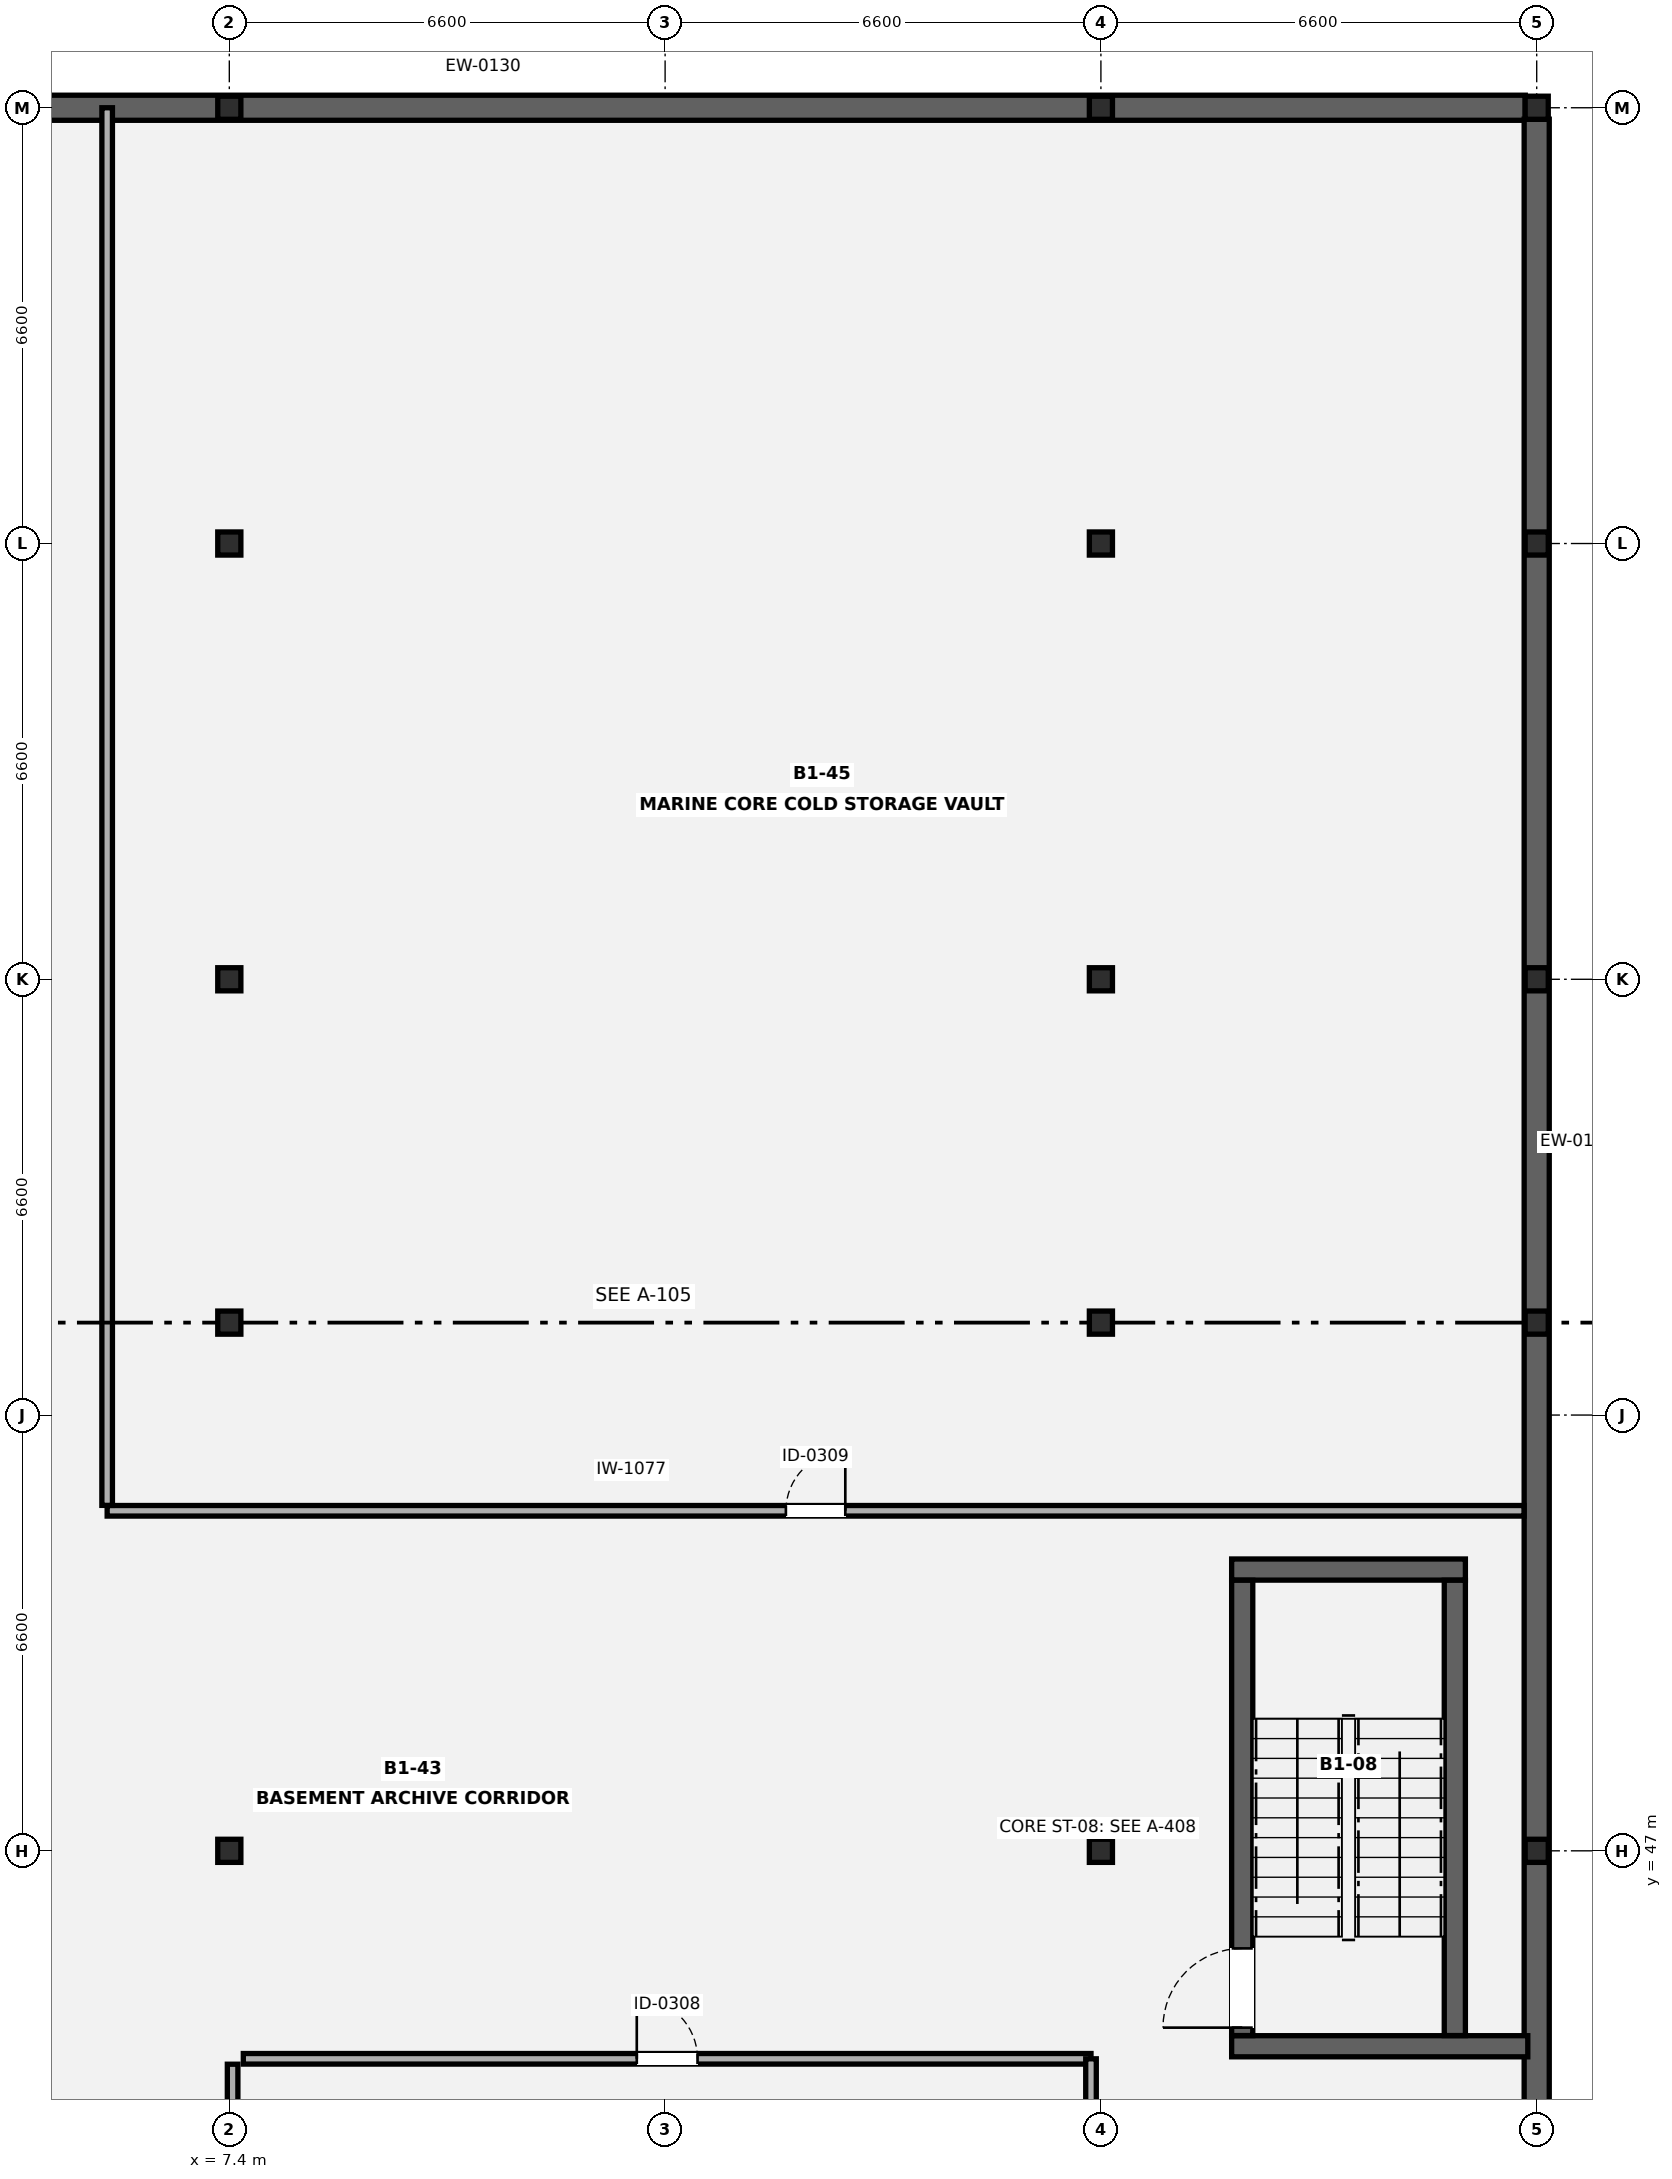
"""IFC4 building model, lengths in metres.
Left out: names, types, materials, properties, quantities, classifications, styles, units other than length and angle.
Written with IfcOpenShell. Run it as: python <this file> out.ifc"""

import sys

from ifc_helpers import new_model, si_unit, direction, frame, frame_2d, origin, origin_2d, place, context, subcontext, project, spatial, rectangle, i_section, extrude, element, fill, save


model = new_model("IFC4")
c1 = context("Model", 3, precision=1e-05, world=origin(), true_north=direction((0.0, 1.0)))
c2 = subcontext(c1, "Body", "Model", "MODEL_VIEW")
j1 = project(units=[si_unit("LENGTHUNIT", "METRE"), si_unit("PLANEANGLEUNIT", "RADIAN")], contexts=[c1])
p1 = place(None, origin())
s1 = spatial("IfcSite", under=j1, at=p1, CompositionType="ELEMENT")
p2 = place(p1, origin())
s2 = spatial("IfcBuilding", under=s1, at=p2, CompositionType="ELEMENT")
p3 = place(p2, frame((0.0, 0.0, -4.2)))
s3 = spatial("IfcBuildingStorey", under=s2, at=p3, CompositionType="ELEMENT", Elevation=-4.2)
for number, where, z_axis, x_axis in (
    (1, (7.4, 47.0, 0.0), (0.0, 0.0, 1.0), (1.0, 0.0, 0.0)),
    (2, (7.4, 55.0, 0.0), (0.0, 0.0, 1.0), (1.0, 0.0, 0.0)),
    (3, (7.4, 60.2, 0.0), (0.0, 0.0, 1.0), (1.0, 0.0, 0.0)),
    (4, (7.4, 66.8, 0.0), (0.0, 0.0, 1.0), (1.0, 0.0, 0.0)),
    (5, (7.4, 73.4, 0.0), (0.0, 0.0, 1.0), (1.0, 0.0, 0.0)),
    (6, (20.6, 47.0, 0.0), (0.0, 0.0, 1.0), (1.0, 0.0, 0.0)),
    (7, (20.6, 55.0, 0.0), (0.0, 0.0, 1.0), (1.0, 0.0, 0.0)),
    (8, (20.6, 60.2, 0.0), (0.0, 0.0, 1.0), (1.0, 0.0, 0.0)),
    (9, (20.6, 66.8, 0.0), (0.0, 0.0, 1.0), (1.0, 0.0, 0.0)),
    (10, (20.6, 73.4, 0.0), (0.0, 0.0, 1.0), (1.0, 0.0, 0.0)),
    (11, (27.2, 47.0, 0.0), (0.0, 0.0, 1.0), (1.0, 0.0, 0.0)),
    (12, (27.2, 55.0, 0.0), (0.0, 0.0, 1.0), (1.0, 0.0, 0.0)),
    (13, (27.2, 60.2, 0.0), (0.0, 0.0, 1.0), (1.0, 0.0, 0.0)),
    (14, (27.2, 66.8, 0.0), (0.0, 0.0, 1.0), (1.0, 0.0, 0.0)),
    (15, (27.2, 73.4, 0.0), (0.0, 0.0, 1.0), (1.0, 0.0, 0.0)),
):
    element("IfcColumn", number, at=place(p3, frame(where, z_axis=z_axis, x_axis=x_axis)), inside=s3, PredefinedType="COLUMN", context=c2, shape_type="SweptSolid", body=[
        extrude(i_section(OverallWidth=0.35, OverallDepth=0.35, WebThickness=0.02, FlangeThickness=0.032, FilletRadius=0.016, at=origin_2d()), origin(), (0.0, 0.0, 1.0), 4.2),
    ])
p4 = place(p3, frame((1.973, 73.4, 0.0), z_axis=(0.0, 0.0, 1.0), x_axis=(1.0, 0.0, 0.0)))
e16 = element("IfcWall", 16, at=p4, inside=s3, PredefinedType="USERDEFINED", context=c2, shape_type="SweptSolid", body=[
    extrude(rectangle(XDim=25.054, YDim=0.38, at=frame_2d((12.527, 0.0))), origin(), (0.0, 0.0, 1.0), 3.9),
])
p5 = place(p3, frame((27.2, 73.227, 0.0), z_axis=(0.0, 0.0, 1.0), x_axis=(0.0, -1.0, 0.0)))
e17 = element("IfcWall", 17, at=p5, inside=s3, PredefinedType="USERDEFINED", context=c2, shape_type="SweptSolid", body=[
    extrude(rectangle(XDim=41.854, YDim=0.38, at=frame_2d((20.927, 0.0))), origin(), (0.0, 0.0, 1.0), 3.9),
])
p6 = place(p3, frame((22.58, 44.04, 0.0), z_axis=(0.0, 0.0, 1.0), x_axis=(1.0, 0.0, 0.0)))
e18 = element("IfcWall", 18, at=p6, inside=s3, PredefinedType="SHEAR", context=c2, shape_type="SweptSolid", body=[
    extrude(rectangle(XDim=4.485, YDim=0.32, at=frame_2d((2.242, 0.0))), origin(), (0.0, 0.0, 1.0), 3.94),
])
p7 = place(p3, frame((22.58, 51.26, 0.0), z_axis=(0.0, 0.0, 1.0), x_axis=(1.0, 0.0, 0.0)))
e19 = element("IfcWall", 19, at=p7, inside=s3, PredefinedType="SHEAR", context=c2, shape_type="SweptSolid", body=[
    extrude(rectangle(XDim=3.54, YDim=0.32, at=frame_2d((1.77, 0.0))), origin(), (0.0, 0.0, 1.0), 3.94),
])
p8 = place(p3, frame((22.74, 44.202, 0.0), z_axis=(0.0, 0.0, 1.0), x_axis=(0.0, 1.0, 0.0)))
e20 = element("IfcWall", 20, at=p8, inside=s3, PredefinedType="SHEAR", context=c2, shape_type="SweptSolid", body=[
    extrude(rectangle(XDim=6.896, YDim=0.32, at=frame_2d((3.448, 0.0))), origin(), (0.0, 0.0, 1.0), 3.94),
])
p9 = place(p8, frame((0.12, 0.0, 0.0)))
e21 = element("IfcOpeningElement", 21, at=p9, cuts=e20, PredefinedType="OPENING", context=c2, shape_type="SweptSolid", body=[
    extrude(rectangle(XDim=1.2, YDim=2.15, at=frame_2d((0.6, 1.075))), frame((0.0, 0.17, 0.0), z_axis=(0.0, -1.0, 0.0), x_axis=(1.0, 0.0, 0.0)), (0.0, 0.0, 1.0), 0.34),
])
p10 = place(p3, frame((25.96, 44.202, 0.0), z_axis=(0.0, 0.0, 1.0), x_axis=(0.0, 1.0, 0.0)))
e22 = element("IfcWall", 22, at=p10, inside=s3, PredefinedType="SHEAR", context=c2, shape_type="SweptSolid", body=[
    extrude(rectangle(XDim=6.896, YDim=0.32, at=frame_2d((3.448, 0.0))), origin(), (0.0, 0.0, 1.0), 3.94),
])
p11 = place(p3, frame((7.612, 43.85, 0.0), z_axis=(0.0, 0.0, 1.0), x_axis=(1.0, 0.0, 0.0)))
e23 = element("IfcWall", 23, at=p11, inside=s3, PredefinedType="PARTITIONING", context=c2, shape_type="SweptSolid", body=[
    extrude(rectangle(XDim=12.838, YDim=0.16, at=frame_2d((6.419, 0.0))), origin(), (0.0, 0.0, 1.0), 3.605),
])
p12 = place(p11, frame((5.959, 0.0, 0.0)))
e24 = element("IfcOpeningElement", 24, at=p12, cuts=e23, PredefinedType="OPENING", context=c2, shape_type="SweptSolid", body=[
    extrude(rectangle(XDim=0.92, YDim=2.12, at=frame_2d((0.46, 1.06))), frame((0.0, 0.09, 0.0), z_axis=(0.0, -1.0, 0.0), x_axis=(1.0, 0.0, 0.0)), (0.0, 0.0, 1.0), 0.18),
])
p13 = place(p3, frame((7.45, 31.2, 0.0), z_axis=(0.0, 0.0, 1.0), x_axis=(0.0, 1.0, 0.0)))
e25 = element("IfcWall", 25, at=p13, inside=s3, PredefinedType="PARTITIONING", context=c2, shape_type="SweptSolid", body=[
    extrude(rectangle(XDim=12.568, YDim=0.16, at=frame_2d((6.284, 0.0))), origin(), (0.0, 0.0, 1.0), 3.445),
])
p14 = place(p3, frame((20.45, 31.2, 0.0), z_axis=(0.0, 0.0, 1.0), x_axis=(0.0, 1.0, 0.0)))
e26 = element("IfcWall", 26, at=p14, inside=s3, PredefinedType="PARTITIONING", context=c2, shape_type="SweptSolid", body=[
    extrude(rectangle(XDim=12.65, YDim=0.16, at=frame_2d((6.325, 0.0))), origin(), (0.0, 0.0, 1.0), 3.445),
])
p15 = place(p3, frame((5.55, 52.15, 0.0), z_axis=(0.0, 0.0, 1.0), x_axis=(1.0, 0.0, 0.0)))
e27 = element("IfcWall", 27, at=p15, inside=s3, PredefinedType="PARTITIONING", context=c2, shape_type="SweptSolid", body=[
    extrude(rectangle(XDim=21.458, YDim=0.16, at=frame_2d((10.729, 0.0))), origin(), (0.0, 0.0, 1.0), 3.94),
])
p16 = place(p15, frame((10.279, 0.0, 0.0)))
e28 = element("IfcOpeningElement", 28, at=p16, cuts=e27, PredefinedType="OPENING", context=c2, shape_type="SweptSolid", body=[
    extrude(rectangle(XDim=0.9, YDim=2.1, at=frame_2d((0.45, 1.05))), frame((0.0, 0.09, 0.0), z_axis=(0.0, -1.0, 0.0), x_axis=(1.0, 0.0, 0.0)), (0.0, 0.0, 1.0), 0.18),
])
p17 = place(p3, frame((5.55, 52.232, 0.0), z_axis=(0.0, 0.0, 1.0), x_axis=(0.0, 1.0, 0.0)))
e29 = element("IfcWall", 29, at=p17, inside=s3, PredefinedType="PARTITIONING", context=c2, shape_type="SweptSolid", body=[
    extrude(rectangle(XDim=21.168, YDim=0.16, at=frame_2d((10.584, 0.0))), origin(), (0.0, 0.0, 1.0), 3.94),
])
p18 = place(p9, origin())
e30 = element("IfcDoor", 30, at=p18, inside=s3, OperationType="SINGLE_SWING_LEFT", PredefinedType="DOOR", context=c2, shape_type="SweptSolid", body=[
    extrude(rectangle(XDim=1.2, YDim=2.15, at=frame_2d((0.6, 1.075))), frame((0.0, 0.025, 0.0), z_axis=(0.0, -1.0, 0.0), x_axis=(1.0, 0.0, 0.0)), (0.0, 0.0, 1.0), 0.05),
])
fill(e21, e30)
p19 = place(p12, origin())
e31 = element("IfcDoor", 31, at=p19, inside=s3, OperationType="SINGLE_SWING_LEFT", PredefinedType="DOOR", context=c2, shape_type="SweptSolid", body=[
    extrude(rectangle(XDim=0.92, YDim=2.12, at=frame_2d((0.46, 1.06))), frame((0.0, 0.025, 0.0), z_axis=(0.0, -1.0, 0.0), x_axis=(1.0, 0.0, 0.0)), (0.0, 0.0, 1.0), 0.05),
])
fill(e24, e31)
p20 = place(p16, origin())
e32 = element("IfcDoor", 32, at=p20, inside=s3, OperationType="SINGLE_SWING_RIGHT", PredefinedType="DOOR", context=c2, shape_type="SweptSolid", body=[
    extrude(rectangle(XDim=0.9, YDim=2.1, at=frame_2d((0.45, 1.05))), frame((0.0, 0.025, 0.0), z_axis=(0.0, -1.0, 0.0), x_axis=(1.0, 0.0, 0.0)), (0.0, 0.0, 1.0), 0.05),
])
fill(e28, e32)
save(model, sys.argv[1])
